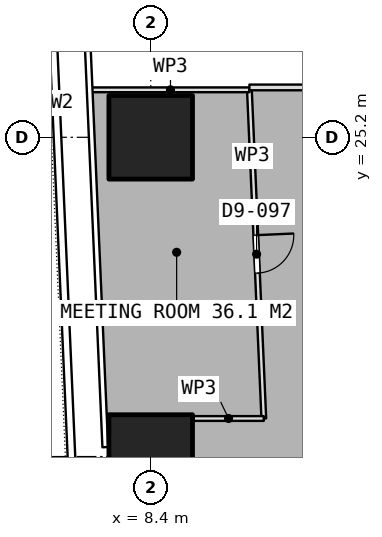
"""IFC4 building model, lengths in metres.
Left out: names, types, materials, properties, quantities, classifications, styles, units other than length and angle.
Written with IfcOpenShell. Run it as: python <this file> out.ifc"""

import sys

from ifc_helpers import new_model, si_unit, direction, frame, frame_2d, origin, origin_2d, place, context, subcontext, project, spatial, rectangle, extrude, element, fill, save


model = new_model("IFC4")
c1 = context("Model", 3, precision=1e-05, world=origin(), true_north=direction((0.0, 1.0)))
c2 = subcontext(c1, "Body", "Model", "MODEL_VIEW")
j1 = project(units=[si_unit("LENGTHUNIT", "METRE"), si_unit("PLANEANGLEUNIT", "RADIAN")], contexts=[c1])
p1 = place(None, origin())
s1 = spatial("IfcSite", under=j1, at=p1, CompositionType="ELEMENT")
p2 = place(p1, origin())
s2 = spatial("IfcBuilding", under=s1, at=p2, CompositionType="ELEMENT")
p3 = place(p2, frame((0.0, 0.0, 40.4)))
s3 = spatial("IfcBuildingStorey", under=s2, at=p3, CompositionType="ELEMENT", Elevation=40.4)
for number, where, z_axis, x_axis in (
    (1, (8.4, 16.8, 0.0), (0.0, 0.0, 1.0), (1.0, 0.0, 0.0)),
    (2, (8.4, 25.2, 0.0), (0.0, 0.0, 1.0), (1.0, 0.0, 0.0)),
):
    element("IfcColumn", number, at=place(p3, frame(where, z_axis=z_axis, x_axis=x_axis)), inside=s3, PredefinedType="COLUMN", context=c2, shape_type="SweptSolid", body=[
        extrude(rectangle(XDim=2.2, YDim=2.2, at=origin_2d()), origin(), (0.0, 0.0, 1.0), 3.75),
    ])
p4 = place(p3, frame((10.997, 26.449, 0.0), z_axis=(0.0, 0.0, 1.0), x_axis=(0.043772583163, -0.999041521141, 0.0)))
e3 = element("IfcWall", 3, at=p4, inside=s3, PredefinedType="PARTITIONING", context=c2, shape_type="SweptSolid", body=[
    extrude(rectangle(XDim=8.656, YDim=0.125, at=frame_2d((4.328, 0.0))), origin(), (0.0, 0.0, 1.0), 3.5),
])
p5 = place(p4, frame((3.828, 0.0, 0.0)))
e4 = element("IfcOpeningElement", 4, at=p5, cuts=e3, PredefinedType="OPENING", context=c2, shape_type="SweptSolid", body=[
    extrude(rectangle(XDim=1.0, YDim=2.1, at=frame_2d((0.5, 1.05))), frame((0.0, 0.073, 0.0), z_axis=(0.0, -1.0, 0.0), x_axis=(1.0, 0.0, 0.0)), (0.0, 0.0, 1.0), 0.145),
])
p6 = place(p3, frame((11.376, 17.801, 0.0), z_axis=(0.0, 0.0, 1.0), x_axis=(-1.0, 0.0, 0.0)))
e5 = element("IfcWall", 5, at=p6, inside=s3, PredefinedType="PARTITIONING", context=c2, shape_type="SweptSolid", body=[
    extrude(rectangle(XDim=1.856, YDim=0.125, at=frame_2d((0.928, 0.0))), origin(), (0.0, 0.0, 1.0), 3.5),
])
p7 = place(p3, frame((6.843, 26.449, 0.0), z_axis=(0.0, 0.0, 1.0), x_axis=(1.0, 0.0, 0.0)))
e6 = element("IfcWall", 6, at=p7, inside=s3, PredefinedType="PARTITIONING", context=c2, shape_type="SweptSolid", body=[
    extrude(rectangle(XDim=4.154, YDim=0.125, at=frame_2d((2.077, 0.0))), origin(), (0.0, 0.0, 1.0), 3.5),
])
p8 = place(p3, frame((10.997, 26.512, 0.0), z_axis=(0.0, 0.0, 1.0), x_axis=(1.0, 0.0, 0.0)))
e7 = element("IfcWall", 7, at=p8, inside=s3, PredefinedType="PARTITIONING", context=c2, shape_type="SweptSolid", body=[
    extrude(rectangle(XDim=11.403, YDim=0.15, at=frame_2d((5.701, 0.0))), origin(), (0.0, 0.0, 1.0), 3.5),
])
p9 = place(p5, origin())
e8 = element("IfcDoor", 8, at=p9, inside=s3, OperationType="SINGLE_SWING_LEFT", PredefinedType="DOOR", context=c2, shape_type="SweptSolid", body=[
    extrude(rectangle(XDim=1.0, YDim=2.1, at=frame_2d((0.5, 1.05))), frame((0.0, 0.025, 0.0), z_axis=(0.0, -1.0, 0.0), x_axis=(1.0, 0.0, 0.0)), (0.0, 0.0, 1.0), 0.05),
])
fill(e4, e8)
save(model, sys.argv[1])
